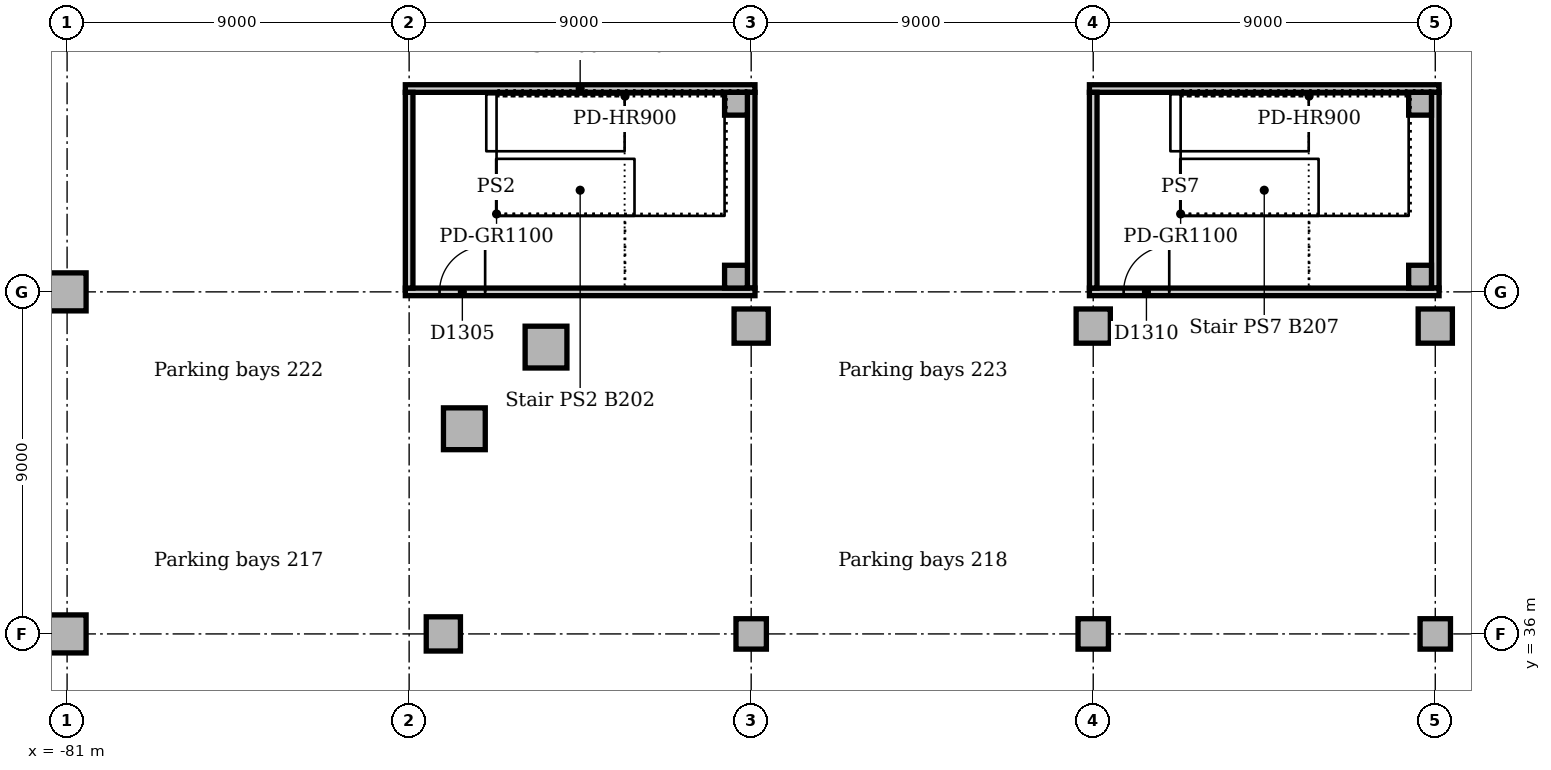
"""IFC4 building model, lengths in metres.
Left out: names, types, materials, properties, quantities, classifications, styles, units other than length and angle.
Written with IfcOpenShell. Run it as: python <this file> out.ifc"""

import sys

from ifc_helpers import new_model, si_unit, direction, frame, frame_2d, origin, origin_2d, place, context, subcontext, project, spatial, rectangle, extrude, element, fill, save


model = new_model("IFC4")
c1 = context("Model", 3, precision=1e-05, world=origin(), true_north=direction((0.0, 1.0)))
c2 = subcontext(c1, "Body", "Model", "MODEL_VIEW")
j1 = project(units=[si_unit("LENGTHUNIT", "METRE"), si_unit("PLANEANGLEUNIT", "RADIAN")], contexts=[c1])
p1 = place(None, origin())
s1 = spatial("IfcSite", under=j1, at=p1, CompositionType="ELEMENT")
p2 = place(p1, origin())
s2 = spatial("IfcBuilding", under=s1, at=p2, CompositionType="ELEMENT")
p3 = place(p2, frame((0.0, 0.0, -9.5)))
s3 = spatial("IfcBuildingStorey", under=s2, at=p3, CompositionType="ELEMENT", Elevation=-9.5)
for number, where, z_axis, x_axis in (
    (1, (-68.398, 43.547, 0.0), (0.0, 0.0, 1.0), (1.0, 0.0, 0.0)),
    (2, (-70.547, 41.398, 0.0), (0.0, 0.0, 1.0), (1.0, 0.0, 0.0)),
):
    element("IfcColumn", number, at=place(p3, frame(where, z_axis=z_axis, x_axis=x_axis)), inside=s3, PredefinedType="COLUMN", context=c2, shape_type="SweptSolid", body=[
        extrude(rectangle(XDim=1.1, YDim=1.1, at=origin_2d()), origin(), (0.0, 0.0, 1.0), 4.15),
    ])
for number, where, z_axis, x_axis in (
    (3, (-63.0, 44.1, 0.0), (0.0, 0.0, 1.0), (1.0, 0.0, 0.0)),
    (4, (-54.0, 44.1, 0.0), (0.0, 0.0, 1.0), (1.0, 0.0, 0.0)),
    (5, (-45.0, 44.1, 0.0), (0.0, 0.0, 1.0), (1.0, 0.0, 0.0)),
    (6, (-71.1, 36.0, 0.0), (0.0, 0.0, 1.0), (1.0, 0.0, 0.0)),
):
    element("IfcColumn", number, at=place(p3, frame(where, z_axis=z_axis, x_axis=x_axis)), inside=s3, PredefinedType="COLUMN", context=c2, shape_type="SweptSolid", body=[
        extrude(rectangle(XDim=0.9, YDim=0.9, at=origin_2d()), origin(), (0.0, 0.0, 1.0), 4.15),
    ])
for number, where, z_axis, x_axis in (
    (7, (-63.0, 36.0, 0.0), (0.0, 0.0, 1.0), (1.0, 0.0, 0.0)),
    (8, (-54.0, 36.0, 0.0), (0.0, 0.0, 1.0), (1.0, 0.0, 0.0)),
    (9, (-45.0, 36.0, 0.0), (0.0, 0.0, 1.0), (1.0, 0.0, 0.0)),
):
    element("IfcColumn", number, at=place(p3, frame(where, z_axis=z_axis, x_axis=x_axis)), inside=s3, PredefinedType="COLUMN", context=c2, shape_type="SweptSolid", body=[
        extrude(rectangle(XDim=0.8, YDim=0.8, at=origin_2d()), origin(), (0.0, 0.0, 1.0), 4.15),
    ])
for number, where, z_axis, x_axis in (
    (10, (-81.0, 36.0, 0.0), (0.0, 0.0, 1.0), (1.0, 0.0, 0.0)),
    (11, (-81.0, 45.0, 0.0), (0.0, 0.0, 1.0), (1.0, 0.0, 0.0)),
):
    element("IfcColumn", number, at=place(p3, frame(where, z_axis=z_axis, x_axis=x_axis)), inside=s3, PredefinedType="COLUMN", context=c2, shape_type="SweptSolid", body=[
        extrude(rectangle(XDim=1.0, YDim=1.0, at=origin_2d()), origin(), (0.0, 0.0, 1.0), 4.15),
    ])
for number, where, z_axis, x_axis in (
    (12, (-63.4, 49.95, 0.0), (0.0, 0.0, 1.0), (1.0, 0.0, 0.0)),
    (13, (-63.4, 45.4, 0.0), (0.0, 0.0, 1.0), (1.0, 0.0, 0.0)),
    (14, (-45.4, 49.95, 0.0), (0.0, 0.0, 1.0), (1.0, 0.0, 0.0)),
    (15, (-45.4, 45.4, 0.0), (0.0, 0.0, 1.0), (1.0, 0.0, 0.0)),
):
    element("IfcColumn", number, at=place(p3, frame(where, z_axis=z_axis, x_axis=x_axis)), inside=s3, PredefinedType="COLUMN", context=c2, shape_type="SweptSolid", body=[
        extrude(rectangle(XDim=0.6, YDim=0.6, at=origin_2d()), origin(), (0.0, 0.0, 1.0), 4.5),
    ])
p4 = place(p3, frame((-72.1, 50.35, 0.0), z_axis=(0.0, 0.0, 1.0), x_axis=(1.0, 0.0, 0.0)))
e16 = element("IfcWall", 16, at=p4, inside=s3, PredefinedType="SOLIDWALL", context=c2, shape_type="SweptSolid", body=[
    extrude(rectangle(XDim=9.2, YDim=0.2, at=frame_2d((4.6, 0.0))), origin(), (0.0, 0.0, 1.0), 4.15),
])
p5 = place(p3, frame((-63.0, 45.1, 0.0), z_axis=(0.0, 0.0, 1.0), x_axis=(0.0, 1.0, 0.0)))
e17 = element("IfcWall", 17, at=p5, inside=s3, PredefinedType="SOLIDWALL", context=c2, shape_type="SweptSolid", body=[
    extrude(rectangle(XDim=5.15, YDim=0.2, at=frame_2d((2.575, 0.0))), origin(), (0.0, 0.0, 1.0), 4.15),
])
p6 = place(p3, frame((-72.1, 45.0, 0.0), z_axis=(0.0, 0.0, 1.0), x_axis=(1.0, 0.0, 0.0)))
e18 = element("IfcWall", 18, at=p6, inside=s3, PredefinedType="SOLIDWALL", context=c2, shape_type="SweptSolid", body=[
    extrude(rectangle(XDim=9.2, YDim=0.2, at=frame_2d((4.6, 0.0))), origin(), (0.0, 0.0, 1.0), 4.15),
])
p7 = place(p6, frame((0.9, 0.0, 0.0)))
e19 = element("IfcOpeningElement", 19, at=p7, cuts=e18, PredefinedType="OPENING", context=c2, shape_type="SweptSolid", body=[
    extrude(rectangle(XDim=1.2, YDim=2.1, at=frame_2d((0.6, 1.05))), frame((0.0, 0.11, 0.0), z_axis=(0.0, -1.0, 0.0), x_axis=(1.0, 0.0, 0.0)), (0.0, 0.0, 1.0), 0.22),
])
p8 = place(p3, frame((-72.0, 45.1, 0.0), z_axis=(0.0, 0.0, 1.0), x_axis=(0.0, 1.0, 0.0)))
e20 = element("IfcWall", 20, at=p8, inside=s3, PredefinedType="SOLIDWALL", context=c2, shape_type="SweptSolid", body=[
    extrude(rectangle(XDim=5.15, YDim=0.2, at=frame_2d((2.575, 0.0))), origin(), (0.0, 0.0, 1.0), 4.15),
])
p9 = place(p3, frame((-54.1, 50.35, 0.0), z_axis=(0.0, 0.0, 1.0), x_axis=(1.0, 0.0, 0.0)))
e21 = element("IfcWall", 21, at=p9, inside=s3, PredefinedType="SOLIDWALL", context=c2, shape_type="SweptSolid", body=[
    extrude(rectangle(XDim=9.2, YDim=0.2, at=frame_2d((4.6, 0.0))), origin(), (0.0, 0.0, 1.0), 4.15),
])
p10 = place(p3, frame((-45.0, 45.1, 0.0), z_axis=(0.0, 0.0, 1.0), x_axis=(0.0, 1.0, 0.0)))
e22 = element("IfcWall", 22, at=p10, inside=s3, PredefinedType="SOLIDWALL", context=c2, shape_type="SweptSolid", body=[
    extrude(rectangle(XDim=5.15, YDim=0.2, at=frame_2d((2.575, 0.0))), origin(), (0.0, 0.0, 1.0), 4.15),
])
p11 = place(p3, frame((-54.1, 45.0, 0.0), z_axis=(0.0, 0.0, 1.0), x_axis=(1.0, 0.0, 0.0)))
e23 = element("IfcWall", 23, at=p11, inside=s3, PredefinedType="SOLIDWALL", context=c2, shape_type="SweptSolid", body=[
    extrude(rectangle(XDim=9.2, YDim=0.2, at=frame_2d((4.6, 0.0))), origin(), (0.0, 0.0, 1.0), 4.15),
])
p12 = place(p11, frame((0.9, 0.0, 0.0)))
e24 = element("IfcOpeningElement", 24, at=p12, cuts=e23, PredefinedType="OPENING", context=c2, shape_type="SweptSolid", body=[
    extrude(rectangle(XDim=1.2, YDim=2.1, at=frame_2d((0.6, 1.05))), frame((0.0, 0.11, 0.0), z_axis=(0.0, -1.0, 0.0), x_axis=(1.0, 0.0, 0.0)), (0.0, 0.0, 1.0), 0.22),
])
p13 = place(p3, frame((-54.0, 45.1, 0.0), z_axis=(0.0, 0.0, 1.0), x_axis=(0.0, 1.0, 0.0)))
e25 = element("IfcWall", 25, at=p13, inside=s3, PredefinedType="SOLIDWALL", context=c2, shape_type="SweptSolid", body=[
    extrude(rectangle(XDim=5.15, YDim=0.2, at=frame_2d((2.575, 0.0))), origin(), (0.0, 0.0, 1.0), 4.15),
])
p14 = place(p7, origin())
e26 = element("IfcDoor", 26, at=p14, inside=s3, OperationType="SINGLE_SWING_RIGHT", PredefinedType="DOOR", context=c2, shape_type="SweptSolid", body=[
    extrude(rectangle(XDim=1.2, YDim=2.1, at=frame_2d((0.6, 1.05))), frame((0.0, 0.025, 0.0), z_axis=(0.0, -1.0, 0.0), x_axis=(1.0, 0.0, 0.0)), (0.0, 0.0, 1.0), 0.05),
])
fill(e19, e26)
p15 = place(p12, origin())
e27 = element("IfcDoor", 27, at=p15, inside=s3, OperationType="SINGLE_SWING_RIGHT", PredefinedType="DOOR", context=c2, shape_type="SweptSolid", body=[
    extrude(rectangle(XDim=1.2, YDim=2.1, at=frame_2d((0.6, 1.05))), frame((0.0, 0.025, 0.0), z_axis=(0.0, -1.0, 0.0), x_axis=(1.0, 0.0, 0.0)), (0.0, 0.0, 1.0), 0.05),
])
fill(e24, e27)
save(model, sys.argv[1])
